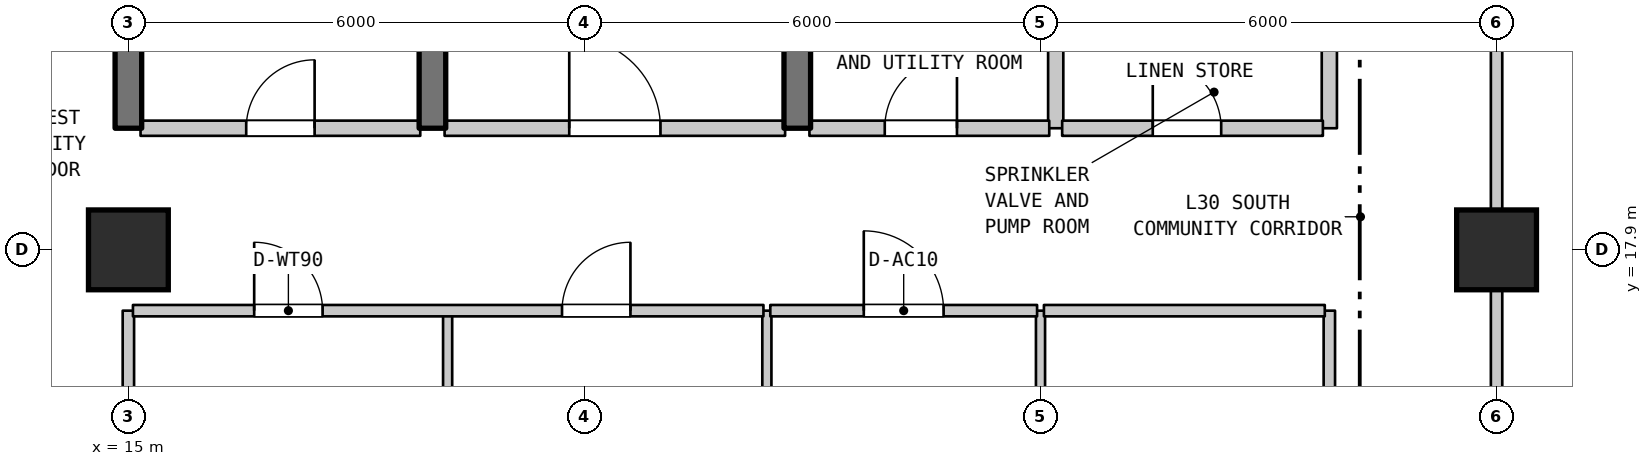
"""IFC4 building model, lengths in metres.
Left out: names, types, materials, properties, quantities, classifications, styles, units other than length and angle.
Written with IfcOpenShell. Run it as: python <this file> out.ifc"""

import sys

from ifc_helpers import new_model, si_unit, direction, frame, frame_2d, origin, origin_2d, place, context, subcontext, project, spatial, rectangle, extrude, element, fill, save


model = new_model("IFC4")
c1 = context("Model", 3, precision=1e-05, world=origin(), true_north=direction((0.0, 1.0)))
c2 = subcontext(c1, "Body", "Model", "MODEL_VIEW")
j1 = project(units=[si_unit("LENGTHUNIT", "METRE"), si_unit("PLANEANGLEUNIT", "RADIAN")], contexts=[c1])
p1 = place(None, origin())
s1 = spatial("IfcSite", under=j1, at=p1, CompositionType="ELEMENT")
p2 = place(p1, origin())
s2 = spatial("IfcBuilding", under=s1, at=p2, CompositionType="ELEMENT")
p3 = place(p2, frame((0.0, 0.0, 125.3)))
s3 = spatial("IfcBuildingStorey", under=s2, at=p3, CompositionType="ELEMENT", Elevation=125.3)
for number, where, z_axis, x_axis in (
    (1, (15.0, 17.9, 0.0), (0.0, 0.0, 1.0), (1.0, 0.0, 0.0)),
    (2, (33.0, 17.9, 0.0), (0.0, 0.0, 1.0), (1.0, 0.0, 0.0)),
):
    element("IfcColumn", number, at=place(p3, frame(where, z_axis=z_axis, x_axis=x_axis)), inside=s3, PredefinedType="COLUMN", context=c2, shape_type="SweptSolid", body=[
        extrude(rectangle(XDim=1.05, YDim=1.05, at=origin_2d()), origin(), (0.0, 0.0, 1.0), 4.5),
    ])
p4 = place(p3, frame((15.0, 13.0, 0.0), z_axis=(0.0, 0.0, 1.0), x_axis=(0.0, 1.0, 0.0)))
e3 = element("IfcWall", 3, at=p4, inside=s3, PredefinedType="STANDARD", context=c2, shape_type="SweptSolid", body=[
    extrude(rectangle(XDim=4.1, YDim=0.15, at=frame_2d((2.05, 0.0))), origin(), (0.0, 0.0, 1.0), 3.735),
])
for number, where, z_axis, x_axis in (
    (4, (15.0, 19.5, 0.0), (0.0, 0.0, 1.0), (0.0, 1.0, 0.0)),
    (5, (19.0, 19.5, 0.0), (0.0, 0.0, 1.0), (0.0, 1.0, 0.0)),
):
    element("IfcWall", number, at=place(p3, frame(where, z_axis=z_axis, x_axis=x_axis)), inside=s3, PredefinedType="SHEAR", context=c2, shape_type="SweptSolid", body=[
        extrude(rectangle(XDim=3.2, YDim=0.35, at=frame_2d((1.6, 0.0))), origin(), (0.0, 0.0, 1.0), 4.185),
    ])
for number, where, z_axis, x_axis in (
    (6, (19.2, 13.0, 0.0), (0.0, 0.0, 1.0), (0.0, 1.0, 0.0)),
    (7, (23.4, 13.0, 0.0), (0.0, 0.0, 1.0), (0.0, 1.0, 0.0)),
):
    element("IfcWall", number, at=place(p3, frame(where, z_axis=z_axis, x_axis=x_axis)), inside=s3, PredefinedType="PARTITIONING", context=c2, shape_type="SweptSolid", body=[
        extrude(rectangle(XDim=4.1, YDim=0.12, at=frame_2d((2.05, 0.0))), origin(), (0.0, 0.0, 1.0), 4.185),
    ])
p5 = place(p3, frame((23.8, 19.5, 0.0), z_axis=(0.0, 0.0, 1.0), x_axis=(0.0, 1.0, 0.0)))
e8 = element("IfcWall", 8, at=p5, inside=s3, PredefinedType="SHEAR", context=c2, shape_type="SweptSolid", body=[
    extrude(rectangle(XDim=3.2, YDim=0.35, at=frame_2d((1.6, 0.0))), origin(), (0.0, 0.0, 1.0), 4.185),
])
p6 = place(p3, frame((27.0, 14.5, 0.0), z_axis=(0.0, 0.0, 1.0), x_axis=(0.0, 1.0, 0.0)))
e9 = element("IfcWall", 9, at=p6, inside=s3, PredefinedType="PARTITIONING", context=c2, shape_type="SweptSolid", body=[
    extrude(rectangle(XDim=2.6, YDim=0.12, at=frame_2d((1.3, 0.0))), origin(), (0.0, 0.0, 1.0), 4.185),
])
p7 = place(p3, frame((27.2, 19.5, 0.0), z_axis=(0.0, 0.0, 1.0), x_axis=(0.0, 1.0, 0.0)))
e10 = element("IfcWall", 10, at=p7, inside=s3, PredefinedType="STANDARD", context=c2, shape_type="SweptSolid", body=[
    extrude(rectangle(XDim=1.6, YDim=0.2, at=frame_2d((0.8, 0.0))), origin(), (0.0, 0.0, 1.0), 4.185),
])
p8 = place(p3, frame((30.8, 14.5, 0.0), z_axis=(0.0, 0.0, 1.0), x_axis=(0.0, 1.0, 0.0)))
e11 = element("IfcWall", 11, at=p8, inside=s3, PredefinedType="STANDARD", context=c2, shape_type="SweptSolid", body=[
    extrude(rectangle(XDim=2.6, YDim=0.15, at=frame_2d((1.3, 0.0))), origin(), (0.0, 0.0, 1.0), 4.185),
])
p9 = place(p3, frame((30.8, 19.5, 0.0), z_axis=(0.0, 0.0, 1.0), x_axis=(0.0, 1.0, 0.0)))
e12 = element("IfcWall", 12, at=p9, inside=s3, PredefinedType="STANDARD", context=c2, shape_type="SweptSolid", body=[
    extrude(rectangle(XDim=1.6, YDim=0.2, at=frame_2d((0.8, 0.0))), origin(), (0.0, 0.0, 1.0), 4.185),
])
p10 = place(p3, frame((33.0, 6.7, 0.0), z_axis=(0.0, 0.0, 1.0), x_axis=(0.0, 1.0, 0.0)))
e13 = element("IfcWall", 13, at=p10, inside=s3, PredefinedType="STANDARD", context=c2, shape_type="SweptSolid", body=[
    extrude(rectangle(XDim=19.2, YDim=0.15, at=frame_2d((9.6, 0.0))), origin(), (0.0, 0.0, 1.0), 3.735),
])
p11 = place(p3, frame((15.06, 17.1, 0.0), z_axis=(0.0, 0.0, 1.0), x_axis=(1.0, 0.0, 0.0)))
e14 = element("IfcWall", 14, at=p11, inside=s3, PredefinedType="STANDARD", context=c2, shape_type="SweptSolid", body=[
    extrude(rectangle(XDim=8.295, YDim=0.15, at=frame_2d((4.147, 0.0))), origin(), (0.0, 0.0, 1.0), 4.185),
])
p12 = place(p11, frame((1.595, 0.0, 0.0)))
e15 = element("IfcOpeningElement", 15, at=p12, cuts=e14, PredefinedType="OPENING", context=c2, shape_type="SweptSolid", body=[
    extrude(rectangle(XDim=0.9, YDim=2.1, at=frame_2d((0.45, 1.05))), frame((0.0, 0.085, 0.0), z_axis=(0.0, -1.0, 0.0), x_axis=(1.0, 0.0, 0.0)), (0.0, 0.0, 1.0), 0.17),
])
p13 = place(p11, frame((5.645, 0.0, 0.0)))
e16 = element("IfcOpeningElement", 16, at=p13, cuts=e14, PredefinedType="OPENING", context=c2, shape_type="SweptSolid", body=[
    extrude(rectangle(XDim=0.9, YDim=2.1, at=frame_2d((0.45, 1.05))), frame((0.0, 0.085, 0.0), z_axis=(0.0, -1.0, 0.0), x_axis=(1.0, 0.0, 0.0)), (0.0, 0.0, 1.0), 0.17),
])
p14 = place(p3, frame((23.445, 17.1, 0.0), z_axis=(0.0, 0.0, 1.0), x_axis=(1.0, 0.0, 0.0)))
e17 = element("IfcWall", 17, at=p14, inside=s3, PredefinedType="STANDARD", context=c2, shape_type="SweptSolid", body=[
    extrude(rectangle(XDim=3.51, YDim=0.15, at=frame_2d((1.755, 0.0))), origin(), (0.0, 0.0, 1.0), 4.185),
])
p15 = place(p14, frame((1.23, 0.0, 0.0)))
e18 = element("IfcOpeningElement", 18, at=p15, cuts=e17, PredefinedType="OPENING", context=c2, shape_type="SweptSolid", body=[
    extrude(rectangle(XDim=1.05, YDim=2.15, at=frame_2d((0.525, 1.075))), frame((0.0, 0.085, 0.0), z_axis=(0.0, -1.0, 0.0), x_axis=(1.0, 0.0, 0.0)), (0.0, 0.0, 1.0), 0.17),
])
p16 = place(p3, frame((27.045, 17.1, 0.0), z_axis=(0.0, 0.0, 1.0), x_axis=(1.0, 0.0, 0.0)))
e19 = element("IfcWall", 19, at=p16, inside=s3, PredefinedType="STANDARD", context=c2, shape_type="SweptSolid", body=[
    extrude(rectangle(XDim=3.695, YDim=0.15, at=frame_2d((1.848, 0.0))), origin(), (0.0, 0.0, 1.0), 4.185),
])
p17 = place(p3, frame((15.16, 19.5, 0.0), z_axis=(0.0, 0.0, 1.0), x_axis=(1.0, 0.0, 0.0)))
e20 = element("IfcWall", 20, at=p17, inside=s3, PredefinedType="STANDARD", context=c2, shape_type="SweptSolid", body=[
    extrude(rectangle(XDim=3.68, YDim=0.2, at=frame_2d((1.84, 0.0))), origin(), (0.0, 0.0, 1.0), 4.185),
])
p18 = place(p17, frame((1.39, 0.0, 0.0)))
e21 = element("IfcOpeningElement", 21, at=p18, cuts=e20, PredefinedType="OPENING", context=c2, shape_type="SweptSolid", body=[
    extrude(rectangle(XDim=0.9, YDim=2.15, at=frame_2d((0.45, 1.075))), frame((0.0, 0.11, 0.0), z_axis=(0.0, -1.0, 0.0), x_axis=(1.0, 0.0, 0.0)), (0.0, 0.0, 1.0), 0.22),
])
p19 = place(p3, frame((19.16, 19.5, 0.0), z_axis=(0.0, 0.0, 1.0), x_axis=(1.0, 0.0, 0.0)))
e22 = element("IfcWall", 22, at=p19, inside=s3, PredefinedType="STANDARD", context=c2, shape_type="SweptSolid", body=[
    extrude(rectangle(XDim=4.48, YDim=0.2, at=frame_2d((2.24, 0.0))), origin(), (0.0, 0.0, 1.0), 4.185),
])
p20 = place(p19, frame((1.64, 0.0, 0.0)))
e23 = element("IfcOpeningElement", 23, at=p20, cuts=e22, PredefinedType="OPENING", context=c2, shape_type="SweptSolid", body=[
    extrude(rectangle(XDim=1.2, YDim=2.2, at=frame_2d((0.6, 1.1))), frame((0.0, 0.11, 0.0), z_axis=(0.0, -1.0, 0.0), x_axis=(1.0, 0.0, 0.0)), (0.0, 0.0, 1.0), 0.22),
])
p21 = place(p3, frame((23.96, 19.5, 0.0), z_axis=(0.0, 0.0, 1.0), x_axis=(1.0, 0.0, 0.0)))
e24 = element("IfcWall", 24, at=p21, inside=s3, PredefinedType="STANDARD", context=c2, shape_type="SweptSolid", body=[
    extrude(rectangle(XDim=3.155, YDim=0.2, at=frame_2d((1.578, 0.0))), origin(), (0.0, 0.0, 1.0), 4.185),
])
p22 = place(p21, frame((0.991, 0.0, 0.0)))
e25 = element("IfcOpeningElement", 25, at=p22, cuts=e24, PredefinedType="OPENING", context=c2, shape_type="SweptSolid", body=[
    extrude(rectangle(XDim=0.95, YDim=2.15, at=frame_2d((0.475, 1.075))), frame((0.0, 0.11, 0.0), z_axis=(0.0, -1.0, 0.0), x_axis=(1.0, 0.0, 0.0)), (0.0, 0.0, 1.0), 0.22),
])
p23 = place(p3, frame((27.285, 19.5, 0.0), z_axis=(0.0, 0.0, 1.0), x_axis=(1.0, 0.0, 0.0)))
e26 = element("IfcWall", 26, at=p23, inside=s3, PredefinedType="STANDARD", context=c2, shape_type="SweptSolid", body=[
    extrude(rectangle(XDim=3.43, YDim=0.2, at=frame_2d((1.715, 0.0))), origin(), (0.0, 0.0, 1.0), 4.185),
])
p24 = place(p23, frame((1.192, 0.0, 0.0)))
e27 = element("IfcOpeningElement", 27, at=p24, cuts=e26, PredefinedType="OPENING", context=c2, shape_type="SweptSolid", body=[
    extrude(rectangle(XDim=0.9, YDim=2.15, at=frame_2d((0.45, 1.075))), frame((0.0, 0.11, 0.0), z_axis=(0.0, -1.0, 0.0), x_axis=(1.0, 0.0, 0.0)), (0.0, 0.0, 1.0), 0.22),
])
p25 = place(p12, origin())
e28 = element("IfcDoor", 28, at=p25, inside=s3, OperationType="SINGLE_SWING_LEFT", PredefinedType="DOOR", context=c2, shape_type="SweptSolid", body=[
    extrude(rectangle(XDim=0.9, YDim=2.1, at=frame_2d((0.45, 1.05))), frame((0.0, 0.025, 0.0), z_axis=(0.0, -1.0, 0.0), x_axis=(1.0, 0.0, 0.0)), (0.0, 0.0, 1.0), 0.05),
])
fill(e15, e28)
p26 = place(p13, origin())
e29 = element("IfcDoor", 29, at=p26, inside=s3, OperationType="SINGLE_SWING_RIGHT", PredefinedType="DOOR", context=c2, shape_type="SweptSolid", body=[
    extrude(rectangle(XDim=0.9, YDim=2.1, at=frame_2d((0.45, 1.05))), frame((0.0, 0.025, 0.0), z_axis=(0.0, -1.0, 0.0), x_axis=(1.0, 0.0, 0.0)), (0.0, 0.0, 1.0), 0.05),
])
fill(e16, e29)
p27 = place(p15, origin())
e30 = element("IfcDoor", 30, at=p27, inside=s3, OperationType="SINGLE_SWING_LEFT", PredefinedType="DOOR", context=c2, shape_type="SweptSolid", body=[
    extrude(rectangle(XDim=1.05, YDim=2.15, at=frame_2d((0.525, 1.075))), frame((0.0, 0.025, 0.0), z_axis=(0.0, -1.0, 0.0), x_axis=(1.0, 0.0, 0.0)), (0.0, 0.0, 1.0), 0.05),
])
fill(e18, e30)
p28 = place(p18, origin())
e31 = element("IfcDoor", 31, at=p28, inside=s3, OperationType="SINGLE_SWING_RIGHT", PredefinedType="DOOR", context=c2, shape_type="SweptSolid", body=[
    extrude(rectangle(XDim=0.9, YDim=2.15, at=frame_2d((0.45, 1.075))), frame((0.0, 0.025, 0.0), z_axis=(0.0, -1.0, 0.0), x_axis=(1.0, 0.0, 0.0)), (0.0, 0.0, 1.0), 0.05),
])
fill(e21, e31)
p29 = place(p20, origin())
e32 = element("IfcDoor", 32, at=p29, inside=s3, OperationType="SINGLE_SWING_LEFT", PredefinedType="DOOR", context=c2, shape_type="SweptSolid", body=[
    extrude(rectangle(XDim=1.2, YDim=2.2, at=frame_2d((0.6, 1.1))), frame((0.0, 0.025, 0.0), z_axis=(0.0, -1.0, 0.0), x_axis=(1.0, 0.0, 0.0)), (0.0, 0.0, 1.0), 0.05),
])
fill(e23, e32)
p30 = place(p22, origin())
e33 = element("IfcDoor", 33, at=p30, inside=s3, OperationType="SINGLE_SWING_RIGHT", PredefinedType="DOOR", context=c2, shape_type="SweptSolid", body=[
    extrude(rectangle(XDim=0.95, YDim=2.15, at=frame_2d((0.475, 1.075))), frame((0.0, 0.025, 0.0), z_axis=(0.0, -1.0, 0.0), x_axis=(1.0, 0.0, 0.0)), (0.0, 0.0, 1.0), 0.05),
])
fill(e25, e33)
p31 = place(p24, origin())
e34 = element("IfcDoor", 34, at=p31, inside=s3, OperationType="SINGLE_SWING_LEFT", PredefinedType="DOOR", context=c2, shape_type="SweptSolid", body=[
    extrude(rectangle(XDim=0.9, YDim=2.15, at=frame_2d((0.45, 1.075))), frame((0.0, 0.025, 0.0), z_axis=(0.0, -1.0, 0.0), x_axis=(1.0, 0.0, 0.0)), (0.0, 0.0, 1.0), 0.05),
])
fill(e27, e34)
save(model, sys.argv[1])
